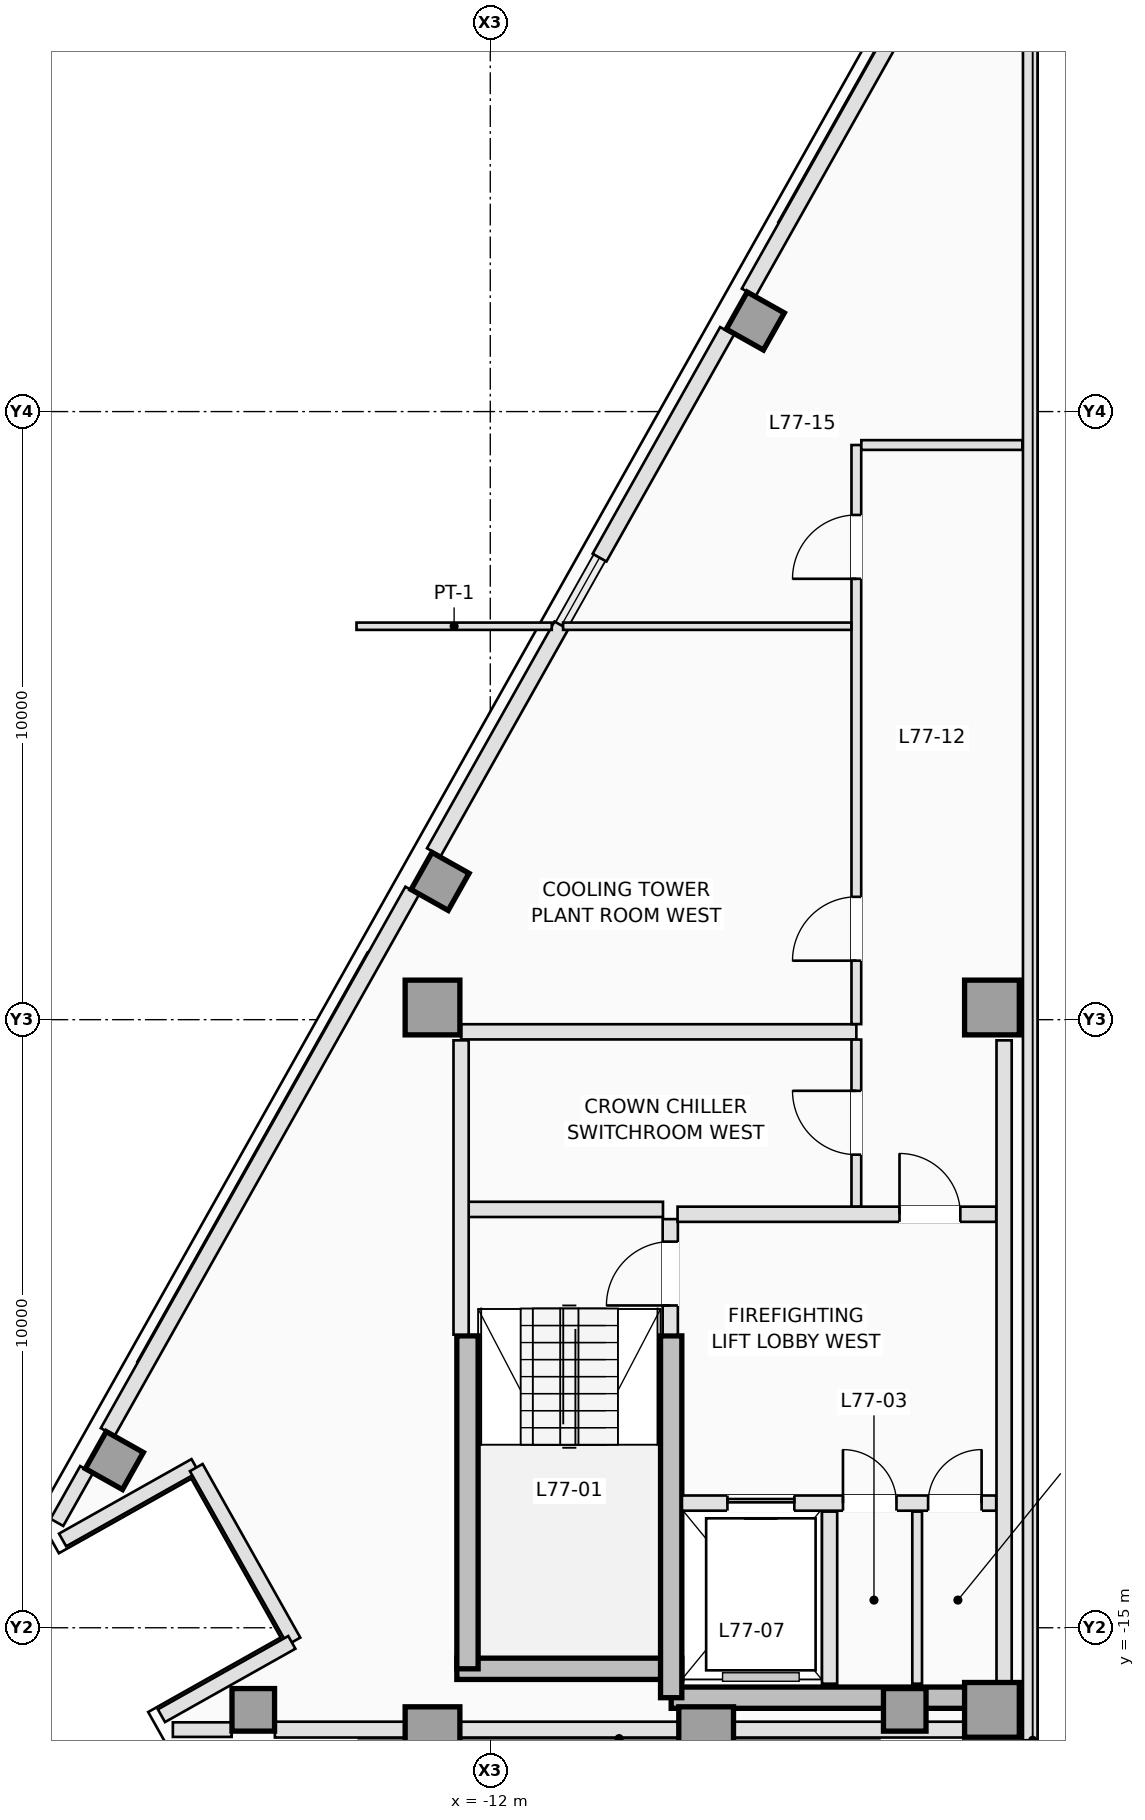
"""IFC4 building model, lengths in metres.
Left out: names, types, materials, properties, quantities, classifications, styles, units other than length and angle.
Written with IfcOpenShell. Run it as: python <this file> out.ifc"""

import sys

from ifc_helpers import new_model, si_unit, direction, frame, frame_2d, origin, origin_2d, place, context, subcontext, project, spatial, rectangle, extrude, element, fill, save


model = new_model("IFC4")
c1 = context("Model", 3, precision=1e-05, world=origin(), true_north=direction((0.0, 1.0)))
c2 = subcontext(c1, "Body", "Model", "MODEL_VIEW")
j1 = project(units=[si_unit("LENGTHUNIT", "METRE"), si_unit("PLANEANGLEUNIT", "RADIAN")], contexts=[c1])
p1 = place(None, origin())
s1 = spatial("IfcSite", under=j1, at=p1, CompositionType="ELEMENT")
p2 = place(p1, origin())
s2 = spatial("IfcBuilding", under=s1, at=p2, CompositionType="ELEMENT")
p3 = place(p2, frame((0.0, 0.0, 277.3)))
s3 = spatial("IfcBuildingStorey", under=s2, at=p3, CompositionType="ELEMENT", Elevation=277.3)
p4 = place(p3, frame((-12.55, -15.675, 0.0), z_axis=(0.0, 0.0, 1.0), x_axis=(1.0, 0.0, 0.0)))
e1 = element("IfcWall", 1, at=p4, inside=s3, PredefinedType="SHEAR", context=c2, shape_type="SweptSolid", body=[
    extrude(rectangle(XDim=3.7, YDim=0.35, at=frame_2d((1.85, 0.0))), origin(), (0.0, 0.0, 1.0), 3.2),
])
p5 = place(p3, frame((-9.025, -16.15, 0.0), z_axis=(0.0, 0.0, 1.0), x_axis=(1.0, 0.0, 0.0)))
e2 = element("IfcWall", 2, at=p5, inside=s3, PredefinedType="SHEAR", context=c2, shape_type="SweptSolid", body=[
    extrude(rectangle(XDim=5.275, YDim=0.35, at=frame_2d((2.637, 0.0))), origin(), (0.0, 0.0, 1.0), 3.2),
])
p6 = place(p3, frame((-12.375, -15.675, 0.0), z_axis=(0.0, 0.0, 1.0), x_axis=(0.0, 1.0, 0.0)))
e3 = element("IfcWall", 3, at=p6, inside=s3, PredefinedType="SHEAR", context=c2, shape_type="SweptSolid", body=[
    extrude(rectangle(XDim=5.475, YDim=0.35, at=frame_2d((2.738, 0.0))), origin(), (0.0, 0.0, 1.0), 3.2),
])
p7 = place(p3, frame((-9.025, -16.15, 0.0), z_axis=(0.0, 0.0, 1.0), x_axis=(0.0, 1.0, 0.0)))
e4 = element("IfcWall", 4, at=p7, inside=s3, PredefinedType="SHEAR", context=c2, shape_type="SweptSolid", body=[
    extrude(rectangle(XDim=5.95, YDim=0.35, at=frame_2d((2.975, 0.0))), origin(), (0.0, 0.0, 1.0), 3.2),
])
for number, where, z_axis, x_axis in (
    (5, (-12.95, -16.75, 0.0), (0.0, 0.0, 1.0), (1.0, 0.0, 0.0)),
    (6, (-8.45, -16.75, 0.0), (0.0, 0.0, 1.0), (1.0, 0.0, 0.0)),
    (7, (-3.75, -16.35, 0.0), (0.0, 0.0, 1.0), (1.0, 0.0, 0.0)),
    (8, (-12.95, -4.8, 0.0), (0.0, 0.0, 1.0), (1.0, 0.0, 0.0)),
    (9, (-3.75, -4.8, 0.0), (0.0, 0.0, 1.0), (1.0, 0.0, 0.0)),
):
    element("IfcColumn", number, at=place(p3, frame(where, z_axis=z_axis, x_axis=x_axis)), inside=s3, PredefinedType="COLUMN", context=c2, shape_type="SweptSolid", body=[
        extrude(rectangle(XDim=0.9, YDim=0.9, at=origin_2d()), origin(), (0.0, 0.0, 1.0), 3.2),
    ])
for number, where, z_axis, x_axis in (
    (10, (-15.898, -16.35, 0.0), (0.0, 0.0, 1.0), (0.0, 1.0, 0.0)),
    (11, (-5.184, -16.35, 0.0), (0.0, 0.0, 1.0), (0.0, 1.0, 0.0)),
    (12, (-7.642, 6.489, 0.0), (0.0, 0.0, 1.0), (-0.872, 0.49, 0.0)),
    (13, (-12.825, -2.727, 0.0), (0.0, 0.0, 1.0), (-0.872, 0.49, 0.0)),
    (14, (-18.182, -12.25, 0.0), (0.0, 0.0, 1.0), (-0.872, 0.49, 0.0)),
):
    element("IfcColumn", number, at=place(p3, frame(where, z_axis=z_axis, x_axis=x_axis)), inside=s3, PredefinedType="COLUMN", context=c2, shape_type="SweptSolid", body=[
        extrude(rectangle(XDim=0.7, YDim=0.7, at=origin_2d()), origin(), (0.0, 0.0, 1.0), 3.2),
    ])
p8 = place(p3, frame((-16.253, -16.675, 0.0), z_axis=(0.0, 0.0, 1.0), x_axis=(-1.0, 0.0, 0.0)))
e15 = element("IfcWall", 15, at=p8, inside=s3, PredefinedType="STANDARD", context=c2, shape_type="SweptSolid", body=[
    extrude(rectangle(XDim=0.967, YDim=0.24, at=frame_2d((0.484, 0.0))), origin(), (0.0, 0.0, 1.0), 2.88),
])
p9 = place(p3, frame((-4.22, -16.675, 0.0), z_axis=(0.0, 0.0, 1.0), x_axis=(-1.0, 0.0, 0.0)))
e16 = element("IfcWall", 16, at=p9, inside=s3, PredefinedType="STANDARD", context=c2, shape_type="SweptSolid", body=[
    extrude(rectangle(XDim=11.323, YDim=0.26, at=frame_2d((5.661, 0.0))), origin(), (0.0, 0.0, 1.0), 2.164),
])
p10 = place(p3, frame((-19.127, -13.267, 0.0), z_axis=(0.0, 0.0, 1.0), x_axis=(0.490261239633, 0.871575537125, 0.0)))
e17 = element("IfcWall", 17, at=p10, inside=s3, PredefinedType="STANDARD", context=c2, shape_type="SweptSolid", body=[
    extrude(rectangle(XDim=0.995, YDim=0.24, at=frame_2d((0.498, 0.0))), origin(), (0.0, 0.0, 1.0), 2.88),
])
p11 = place(p3, frame((-18.292, -11.781, 0.0), z_axis=(0.0, 0.0, 1.0), x_axis=(0.490270316201, 0.871570431492, 0.0)))
e18 = element("IfcWall", 18, at=p11, inside=s3, PredefinedType="STANDARD", context=c2, shape_type="SweptSolid", body=[
    extrude(rectangle(XDim=10.216, YDim=0.26, at=frame_2d((5.108, 0.0))), origin(), (0.0, 0.0, 1.0), 2.88),
])
p12 = place(p3, frame((-7.751, 6.958, 0.0), z_axis=(0.0, 0.0, 1.0), x_axis=(0.490260105081, 0.871576175309, 0.0)))
e19 = element("IfcWall", 19, at=p12, inside=s3, PredefinedType="STANDARD", context=c2, shape_type="SweptSolid", body=[
    extrude(rectangle(XDim=10.217, YDim=0.26, at=frame_2d((5.108, 0.0))), origin(), (0.0, 0.0, 1.0), 2.88),
])
p13 = place(p3, frame((-12.927, -2.245, 0.0), z_axis=(0.0, 0.0, 1.0), x_axis=(0.490220591932, 0.871598400209, 0.0)))
e20 = element("IfcWall", 20, at=p13, inside=s3, PredefinedType="STANDARD", context=c2, shape_type="SweptSolid", body=[
    extrude(rectangle(XDim=4.278, YDim=0.26, at=frame_2d((2.139, 0.0))), origin(), (0.0, 0.0, 1.0), 2.88),
])
p14 = place(p3, frame((-10.203, 2.598, 0.0), z_axis=(0.0, 0.0, 1.0), x_axis=(0.490244979871, 0.871584683041, 0.0)))
e21 = element("IfcWall", 21, at=p14, inside=s3, PredefinedType="STANDARD", context=c2, shape_type="SweptSolid", body=[
    extrude(rectangle(XDim=4.277, YDim=0.26, at=frame_2d((2.139, 0.0))), origin(), (0.0, 0.0, 1.0), 2.88),
])
p15 = place(p3, frame((-19.033, -13.556, 0.0), z_axis=(0.0, 0.0, 1.0), x_axis=(0.871588577066, 0.490238056792, 0.0)))
e22 = element("IfcWall", 22, at=p15, inside=s3, PredefinedType="STANDARD", context=c2, shape_type="SweptSolid", body=[
    extrude(rectangle(XDim=2.5, YDim=0.24, at=frame_2d((1.25, 0.0))), origin(), (0.0, 0.0, 1.0), 2.88),
])
p16 = place(p3, frame((-16.835, -12.366, 0.0), z_axis=(0.0, 0.0, 1.0), x_axis=(0.490293083368, -0.871557624258, 0.0)))
e23 = element("IfcWall", 23, at=p16, inside=s3, PredefinedType="STANDARD", context=c2, shape_type="SweptSolid", body=[
    extrude(rectangle(XDim=3.276, YDim=0.24, at=frame_2d((1.638, 0.0))), origin(), (0.0, 0.0, 1.0), 2.164),
])
p17 = place(p3, frame((-15.264, -15.24, 0.0), z_axis=(0.0, 0.0, 1.0), x_axis=(-0.87157023615, -0.490270663468, 0.0)))
e24 = element("IfcWall", 24, at=p17, inside=s3, PredefinedType="STANDARD", context=c2, shape_type="SweptSolid", body=[
    extrude(rectangle(XDim=2.46, YDim=0.24, at=frame_2d((1.23, 0.0))), origin(), (0.0, 0.0, 1.0), 2.88),
])
p18 = place(p3, frame((-3.12, 17.2, 0.0), z_axis=(0.0, 0.0, 1.0), x_axis=(0.0, -1.0, 0.0)))
e25 = element("IfcWall", 25, at=p18, inside=s3, PredefinedType="STANDARD", context=c2, shape_type="SweptSolid", body=[
    extrude(rectangle(XDim=34.05, YDim=0.24, at=frame_2d((17.025, 0.0))), origin(), (0.0, 0.0, 1.0), 2.164),
])
p19 = place(p3, frame((-9.04, -10.18, 0.0), z_axis=(0.0, 0.0, 1.0), x_axis=(0.0, 1.0, 0.0)))
e26 = element("IfcWall", 26, at=p19, inside=s3, PredefinedType="PARTITIONING", context=c2, shape_type="SweptSolid", body=[
    extrude(rectangle(XDim=1.9, YDim=0.25, at=frame_2d((0.95, 0.0))), origin(), (0.0, 0.0, 1.0), 2.88),
])
p20 = place(p19, frame((0.48, 0.0, 0.0)))
e27 = element("IfcOpeningElement", 27, at=p20, cuts=e26, PredefinedType="OPENING", context=c2, shape_type="SweptSolid", body=[
    extrude(rectangle(XDim=1.05, YDim=2.15, at=frame_2d((0.525, 1.075))), frame((0.0, 0.135, 0.0), z_axis=(0.0, -1.0, 0.0), x_axis=(1.0, 0.0, 0.0)), (0.0, 0.0, 1.0), 0.27),
])
p21 = place(p3, frame((-12.38, -8.12, 0.0), z_axis=(0.0, 0.0, 1.0), x_axis=(1.0, 0.0, 0.0)))
e28 = element("IfcWall", 28, at=p21, inside=s3, PredefinedType="PARTITIONING", context=c2, shape_type="SweptSolid", body=[
    extrude(rectangle(XDim=3.22, YDim=0.25, at=frame_2d((1.61, 0.0))), origin(), (0.0, 0.0, 1.0), 2.88),
])
p22 = place(p3, frame((-12.48, -10.18, 0.0), z_axis=(0.0, 0.0, 1.0), x_axis=(0.0, 1.0, 0.0)))
e29 = element("IfcWall", 29, at=p22, inside=s3, PredefinedType="PARTITIONING", context=c2, shape_type="SweptSolid", body=[
    extrude(rectangle(XDim=4.84, YDim=0.25, at=frame_2d((2.42, 0.0))), origin(), (0.0, 0.0, 1.0), 2.88),
])
p23 = place(p3, frame((-8.848, -12.95, 0.0), z_axis=(0.0, 0.0, 1.0), x_axis=(1.0, 0.0, 0.0)))
e30 = element("IfcWall", 30, at=p23, inside=s3, PredefinedType="PARTITIONING", context=c2, shape_type="SweptSolid", body=[
    extrude(rectangle(XDim=5.168, YDim=0.25, at=frame_2d((2.584, 0.0))), origin(), (0.0, 0.0, 1.0), 2.88),
])
p24 = place(p23, frame((0.748, 0.0, 0.0)))
e31 = element("IfcOpeningElement", 31, at=p24, cuts=e30, PredefinedType="OPENING", context=c2, shape_type="SweptSolid", body=[
    extrude(rectangle(XDim=1.1, YDim=2.15, at=frame_2d((0.55, 1.075))), frame((0.0, 0.135, 0.0), z_axis=(0.0, -1.0, 0.0), x_axis=(1.0, 0.0, 0.0)), (0.0, 0.0, 1.0), 0.27),
])
p25 = place(p23, frame((2.648, 0.0, 0.0)))
e32 = element("IfcOpeningElement", 32, at=p25, cuts=e30, PredefinedType="OPENING", context=c2, shape_type="SweptSolid", body=[
    extrude(rectangle(XDim=0.88, YDim=2.1, at=frame_2d((0.44, 1.05))), frame((0.0, 0.135, 0.0), z_axis=(0.0, -1.0, 0.0), x_axis=(1.0, 0.0, 0.0)), (0.0, 0.0, 1.0), 0.27),
])
p26 = place(p23, frame((4.048, 0.0, 0.0)))
e33 = element("IfcOpeningElement", 33, at=p26, cuts=e30, PredefinedType="OPENING", context=c2, shape_type="SweptSolid", body=[
    extrude(rectangle(XDim=0.88, YDim=2.1, at=frame_2d((0.44, 1.05))), frame((0.0, 0.135, 0.0), z_axis=(0.0, -1.0, 0.0), x_axis=(1.0, 0.0, 0.0)), (0.0, 0.0, 1.0), 0.27),
])
p27 = place(p3, frame((-6.42, -15.92, 0.0), z_axis=(0.0, 0.0, 1.0), x_axis=(0.0, 1.0, 0.0)))
e34 = element("IfcWall", 34, at=p27, inside=s3, PredefinedType="PARTITIONING", context=c2, shape_type="SweptSolid", body=[
    extrude(rectangle(XDim=2.83, YDim=0.25, at=frame_2d((1.415, 0.0))), origin(), (0.0, 0.0, 1.0), 2.88),
])
p28 = place(p3, frame((-4.98, -15.92, 0.0), z_axis=(0.0, 0.0, 1.0), x_axis=(0.0, 1.0, 0.0)))
e35 = element("IfcWall", 35, at=p28, inside=s3, PredefinedType="PARTITIONING", context=c2, shape_type="SweptSolid", body=[
    extrude(rectangle(XDim=2.83, YDim=0.16, at=frame_2d((1.415, 0.0))), origin(), (0.0, 0.0, 1.0), 2.88),
])
p29 = place(p3, frame((-8.92, -8.2, 0.0), z_axis=(0.0, 0.0, 1.0), x_axis=(1.0, 0.0, 0.0)))
e36 = element("IfcWall", 36, at=p29, inside=s3, PredefinedType="PARTITIONING", context=c2, shape_type="SweptSolid", body=[
    extrude(rectangle(XDim=5.24, YDim=0.25, at=frame_2d((2.62, 0.0))), origin(), (0.0, 0.0, 1.0), 2.88),
])
p30 = place(p29, frame((3.65, 0.0, 0.0)))
e37 = element("IfcOpeningElement", 37, at=p30, cuts=e36, PredefinedType="OPENING", context=c2, shape_type="SweptSolid", body=[
    extrude(rectangle(XDim=1.0, YDim=2.15, at=frame_2d((0.5, 1.075))), frame((0.0, 0.135, 0.0), z_axis=(0.0, -1.0, 0.0), x_axis=(1.0, 0.0, 0.0)), (0.0, 0.0, 1.0), 0.27),
])
p31 = place(p3, frame((-3.55, -15.898, 0.0), z_axis=(0.0, 0.0, 1.0), x_axis=(0.0, 1.0, 0.0)))
e38 = element("IfcWall", 38, at=p31, inside=s3, PredefinedType="PARTITIONING", context=c2, shape_type="SweptSolid", body=[
    extrude(rectangle(XDim=10.558, YDim=0.25, at=frame_2d((5.279, 0.0))), origin(), (0.0, 0.0, 1.0), 2.88),
])
p32 = place(p3, frame((-12.48, -5.2, 0.0), z_axis=(0.0, 0.0, 1.0), x_axis=(1.0, 0.0, 0.0)))
e39 = element("IfcWall", 39, at=p32, inside=s3, PredefinedType="PARTITIONING", context=c2, shape_type="SweptSolid", body=[
    extrude(rectangle(XDim=6.5, YDim=0.25, at=frame_2d((3.25, 0.0))), origin(), (0.0, 0.0, 1.0), 2.88),
])
p33 = place(p3, frame((-5.98, -8.073, 0.0), z_axis=(0.0, 0.0, 1.0), x_axis=(0.0, 1.0, 0.0)))
e40 = element("IfcWall", 40, at=p33, inside=s3, PredefinedType="PARTITIONING", context=c2, shape_type="SweptSolid", body=[
    extrude(rectangle(XDim=2.746, YDim=0.16, at=frame_2d((1.373, 0.0))), origin(), (0.0, 0.0, 1.0), 2.88),
])
p34 = place(p33, frame((0.853, 0.0, 0.0)))
e41 = element("IfcOpeningElement", 41, at=p34, cuts=e40, PredefinedType="OPENING", context=c2, shape_type="SweptSolid", body=[
    extrude(rectangle(XDim=1.05, YDim=2.12, at=frame_2d((0.525, 1.06))), frame((0.0, 0.09, 0.0), z_axis=(0.0, -1.0, 0.0), x_axis=(1.0, 0.0, 0.0)), (0.0, 0.0, 1.0), 0.18),
])
p35 = place(p3, frame((-5.98, -5.073, 0.0), z_axis=(0.0, 0.0, 1.0), x_axis=(0.0, 1.0, 0.0)))
e42 = element("IfcWall", 42, at=p35, inside=s3, PredefinedType="PARTITIONING", context=c2, shape_type="SweptSolid", body=[
    extrude(rectangle(XDim=9.523, YDim=0.16, at=frame_2d((4.761, 0.0))), origin(), (0.0, 0.0, 1.0), 2.88),
])
p36 = place(p35, frame((1.043, 0.0, 0.0)))
e43 = element("IfcOpeningElement", 43, at=p36, cuts=e42, PredefinedType="OPENING", context=c2, shape_type="SweptSolid", body=[
    extrude(rectangle(XDim=1.05, YDim=2.12, at=frame_2d((0.525, 1.06))), frame((0.0, 0.09, 0.0), z_axis=(0.0, -1.0, 0.0), x_axis=(1.0, 0.0, 0.0)), (0.0, 0.0, 1.0), 0.18),
])
p37 = place(p35, frame((7.323, 0.0, 0.0)))
e44 = element("IfcOpeningElement", 44, at=p37, cuts=e42, PredefinedType="OPENING", context=c2, shape_type="SweptSolid", body=[
    extrude(rectangle(XDim=1.05, YDim=2.12, at=frame_2d((0.525, 1.06))), frame((0.0, 0.09, 0.0), z_axis=(0.0, -1.0, 0.0), x_axis=(1.0, 0.0, 0.0)), (0.0, 0.0, 1.0), 0.18),
])
p38 = place(p3, frame((-5.898, 4.45, 0.0), z_axis=(0.0, 0.0, 1.0), x_axis=(1.0, 0.0, 0.0)))
e45 = element("IfcWall", 45, at=p38, inside=s3, PredefinedType="PARTITIONING", context=c2, shape_type="SweptSolid", body=[
    extrude(rectangle(XDim=2.648, YDim=0.16, at=frame_2d((1.324, 0.0))), origin(), (0.0, 0.0, 1.0), 2.88),
])
p39 = place(p3, frame((-14.2, 1.47, 0.0), z_axis=(0.0, 0.0, 1.0), x_axis=(1.0, 0.0, 0.0)))
e46 = element("IfcWall", 46, at=p39, inside=s3, PredefinedType="PARTITIONING", context=c2, shape_type="SweptSolid", body=[
    extrude(rectangle(XDim=3.211, YDim=0.12, at=frame_2d((1.605, 0.0))), origin(), (0.0, 0.0, 1.0), 2.88),
])
p40 = place(p3, frame((-10.802, 1.47, 0.0), z_axis=(0.0, 0.0, 1.0), x_axis=(1.0, 0.0, 0.0)))
e47 = element("IfcWall", 47, at=p40, inside=s3, PredefinedType="PARTITIONING", context=c2, shape_type="SweptSolid", body=[
    extrude(rectangle(XDim=4.74, YDim=0.12, at=frame_2d((2.37, 0.0))), origin(), (0.0, 0.0, 1.0), 2.88),
])
p41 = place(p24, origin())
e48 = element("IfcDoor", 48, at=p41, inside=s3, OperationType="SLIDING_TO_LEFT", PredefinedType="DOOR", context=c2, shape_type="SweptSolid", body=[
    extrude(rectangle(XDim=1.1, YDim=2.15, at=frame_2d((0.55, 1.075))), frame((0.0, 0.025, 0.0), z_axis=(0.0, -1.0, 0.0), x_axis=(1.0, 0.0, 0.0)), (0.0, 0.0, 1.0), 0.05),
])
fill(e31, e48)
p42 = place(p20, origin())
e49 = element("IfcDoor", 49, at=p42, inside=s3, OperationType="SINGLE_SWING_LEFT", PredefinedType="DOOR", context=c2, shape_type="SweptSolid", body=[
    extrude(rectangle(XDim=1.05, YDim=2.15, at=frame_2d((0.525, 1.075))), frame((0.0, 0.025, 0.0), z_axis=(0.0, -1.0, 0.0), x_axis=(1.0, 0.0, 0.0)), (0.0, 0.0, 1.0), 0.05),
])
fill(e27, e49)
p43 = place(p25, origin())
e50 = element("IfcDoor", 50, at=p43, inside=s3, OperationType="SINGLE_SWING_LEFT", PredefinedType="TRAPDOOR", context=c2, shape_type="SweptSolid", body=[
    extrude(rectangle(XDim=0.88, YDim=2.1, at=frame_2d((0.44, 1.05))), frame((0.0, 0.025, 0.0), z_axis=(0.0, -1.0, 0.0), x_axis=(1.0, 0.0, 0.0)), (0.0, 0.0, 1.0), 0.05),
])
fill(e32, e50)
p44 = place(p26, origin())
e51 = element("IfcDoor", 51, at=p44, inside=s3, OperationType="SINGLE_SWING_RIGHT", PredefinedType="TRAPDOOR", context=c2, shape_type="SweptSolid", body=[
    extrude(rectangle(XDim=0.88, YDim=2.1, at=frame_2d((0.44, 1.05))), frame((0.0, 0.025, 0.0), z_axis=(0.0, -1.0, 0.0), x_axis=(1.0, 0.0, 0.0)), (0.0, 0.0, 1.0), 0.05),
])
fill(e33, e51)
p45 = place(p30, origin())
e52 = element("IfcDoor", 52, at=p45, inside=s3, OperationType="SINGLE_SWING_LEFT", PredefinedType="DOOR", context=c2, shape_type="SweptSolid", body=[
    extrude(rectangle(XDim=1.0, YDim=2.15, at=frame_2d((0.5, 1.075))), frame((0.0, 0.025, 0.0), z_axis=(0.0, -1.0, 0.0), x_axis=(1.0, 0.0, 0.0)), (0.0, 0.0, 1.0), 0.05),
])
fill(e37, e52)
p46 = place(p34, origin())
e53 = element("IfcDoor", 53, at=p46, inside=s3, OperationType="SINGLE_SWING_RIGHT", PredefinedType="DOOR", context=c2, shape_type="SweptSolid", body=[
    extrude(rectangle(XDim=1.05, YDim=2.12, at=frame_2d((0.525, 1.06))), frame((0.0, 0.025, 0.0), z_axis=(0.0, -1.0, 0.0), x_axis=(1.0, 0.0, 0.0)), (0.0, 0.0, 1.0), 0.05),
])
fill(e41, e53)
p47 = place(p36, origin())
e54 = element("IfcDoor", 54, at=p47, inside=s3, OperationType="SINGLE_SWING_LEFT", PredefinedType="DOOR", context=c2, shape_type="SweptSolid", body=[
    extrude(rectangle(XDim=1.05, YDim=2.12, at=frame_2d((0.525, 1.06))), frame((0.0, 0.025, 0.0), z_axis=(0.0, -1.0, 0.0), x_axis=(1.0, 0.0, 0.0)), (0.0, 0.0, 1.0), 0.05),
])
fill(e43, e54)
p48 = place(p37, origin())
e55 = element("IfcDoor", 55, at=p48, inside=s3, OperationType="SINGLE_SWING_LEFT", PredefinedType="DOOR", context=c2, shape_type="SweptSolid", body=[
    extrude(rectangle(XDim=1.05, YDim=2.12, at=frame_2d((0.525, 1.06))), frame((0.0, 0.025, 0.0), z_axis=(0.0, -1.0, 0.0), x_axis=(1.0, 0.0, 0.0)), (0.0, 0.0, 1.0), 0.05),
])
fill(e44, e55)
save(model, sys.argv[1])
